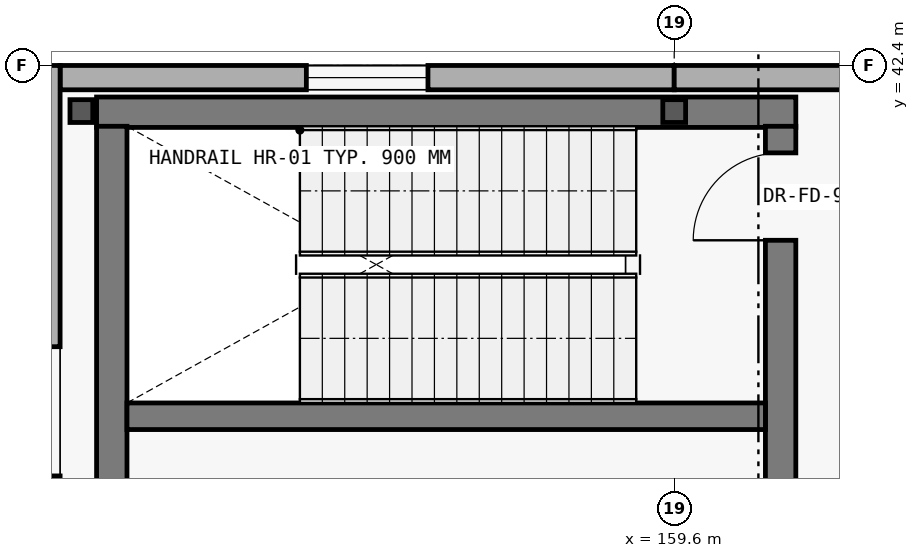
"""IFC4 building model, lengths in metres.
Left out: names, types, materials, properties, quantities, classifications, styles, units other than length and angle.
Written with IfcOpenShell. Run it as: python <this file> out.ifc"""

import sys

from ifc_helpers import new_model, si_unit, direction, frame, frame_2d, origin, origin_2d, place, context, subcontext, project, spatial, rectangle, i_section, extrude, element, fill, save


model = new_model("IFC4")
c1 = context("Model", 3, precision=1e-05, world=origin(), true_north=direction((0.0, 1.0)))
c2 = subcontext(c1, "Body", "Model", "MODEL_VIEW")
j1 = project(units=[si_unit("LENGTHUNIT", "METRE"), si_unit("PLANEANGLEUNIT", "RADIAN")], contexts=[c1])
p1 = place(None, origin())
s1 = spatial("IfcSite", under=j1, at=p1, CompositionType="ELEMENT")
p2 = place(p1, origin())
s2 = spatial("IfcBuilding", under=s1, at=p2, CompositionType="ELEMENT")
p3 = place(p2, frame((0.0, 0.0, 5.4)))
s3 = spatial("IfcBuildingStorey", under=s2, at=p3, CompositionType="ELEMENT", Elevation=5.4)
for number, where, z_axis, x_axis in (
    (1, (151.8, 41.8, 0.0), (0.0, 0.0, 1.0), (1.0, 0.0, 0.0)),
    (2, (159.6, 41.8, 0.0), (0.0, 0.0, 1.0), (1.0, 0.0, 0.0)),
):
    element("IfcColumn", number, at=place(p3, frame(where, z_axis=z_axis, x_axis=x_axis)), inside=s3, PredefinedType="COLUMN", context=c2, shape_type="SweptSolid", body=[
        extrude(i_section(OverallWidth=0.3, OverallDepth=0.3, WebThickness=0.011, FlangeThickness=0.019, at=origin_2d()), origin(), (0.0, 0.0, 1.0), 5.4),
    ])
p4 = place(p3, frame((151.52, 42.24, 0.0), z_axis=(0.0, 0.0, 1.0), x_axis=(1.0, 0.0, 0.0)))
e3 = element("IfcWall", 3, at=p4, inside=s3, PredefinedType="SOLIDWALL", context=c2, shape_type="SweptSolid", body=[
    extrude(rectangle(XDim=8.08, YDim=0.32, at=frame_2d((4.04, 0.0))), origin(), (0.0, 0.0, 1.0), 5.1),
])
p5 = place(p4, frame((3.24, 0.0, 0.9)))
e4 = element("IfcOpeningElement", 4, at=p5, cuts=e3, PredefinedType="OPENING", context=c2, shape_type="SweptSolid", body=[
    extrude(rectangle(XDim=1.6, YDim=1.6, at=frame_2d((0.8, 0.8))), frame((0.0, 0.17, 0.0), z_axis=(0.0, -1.0, 0.0), x_axis=(1.0, 0.0, 0.0)), (0.0, 0.0, 1.0), 0.34),
])
p6 = place(p3, frame((159.6, 42.24, 0.0), z_axis=(0.0, 0.0, 1.0), x_axis=(1.0, 0.0, 0.0)))
e5 = element("IfcWall", 5, at=p6, inside=s3, PredefinedType="SOLIDWALL", context=c2, shape_type="SweptSolid", body=[
    extrude(rectangle(XDim=8.4, YDim=0.32, at=frame_2d((4.2, 0.0))), origin(), (0.0, 0.0, 1.0), 5.1),
])
p7 = place(p6, frame((3.3, 0.0, 0.9)))
e6 = element("IfcOpeningElement", 6, at=p7, cuts=e5, PredefinedType="OPENING", context=c2, shape_type="SweptSolid", body=[
    extrude(rectangle(XDim=1.8, YDim=1.6, at=frame_2d((0.9, 0.8))), frame((0.0, 0.17, 0.0), z_axis=(0.0, -1.0, 0.0), x_axis=(1.0, 0.0, 0.0)), (0.0, 0.0, 1.0), 0.34),
])
p8 = place(p3, frame((151.36, 33.3, 0.0), z_axis=(0.0, 0.0, 1.0), x_axis=(0.0, 1.0, 0.0)))
e7 = element("IfcWall", 7, at=p8, inside=s3, PredefinedType="SOLIDWALL", context=c2, shape_type="SweptSolid", body=[
    extrude(rectangle(XDim=9.1, YDim=0.32, at=frame_2d((4.55, 0.0))), origin(), (0.0, 0.0, 1.0), 5.1),
])
p9 = place(p8, frame((3.7, 0.0, 0.9)))
e8 = element("IfcOpeningElement", 8, at=p9, cuts=e7, PredefinedType="OPENING", context=c2, shape_type="SweptSolid", body=[
    extrude(rectangle(XDim=1.7, YDim=2.0, at=frame_2d((0.85, 1.0))), frame((0.0, 0.17, 0.0), z_axis=(0.0, -1.0, 0.0), x_axis=(1.0, 0.0, 0.0)), (0.0, 0.0, 1.0), 0.34),
])
p10 = place(p3, frame((161.2, 41.785, 0.0), z_axis=(0.0, 0.0, 1.0), x_axis=(-1.0, 0.0, 0.0)))
e9 = element("IfcWall", 9, at=p10, inside=s3, PredefinedType="SHEAR", context=c2, shape_type="SweptSolid", body=[
    extrude(rectangle(XDim=9.2, YDim=0.4, at=frame_2d((4.6, 0.0))), origin(), (0.0, 0.0, 1.0), 5.08),
])
p11 = place(p3, frame((152.2, 41.6, 0.0), z_axis=(0.0, 0.0, 1.0), x_axis=(0.0, -1.0, 0.0)))
e10 = element("IfcWall", 10, at=p11, inside=s3, PredefinedType="SHEAR", context=c2, shape_type="SweptSolid", body=[
    extrude(rectangle(XDim=7.4, YDim=0.4, at=frame_2d((3.7, 0.0))), origin(), (0.0, 0.0, 1.0), 5.08),
])
p12 = place(p3, frame((161.0, 34.2, 0.0), z_axis=(0.0, 0.0, 1.0), x_axis=(0.0, 1.0, 0.0)))
e11 = element("IfcWall", 11, at=p12, inside=s3, PredefinedType="SHEAR", context=c2, shape_type="SweptSolid", body=[
    extrude(rectangle(XDim=7.4, YDim=0.4, at=frame_2d((3.7, 0.0))), origin(), (0.0, 0.0, 1.0), 5.08),
])
p13 = place(p12, frame((5.9, 0.0, 0.0)))
e12 = element("IfcOpeningElement", 12, at=p13, cuts=e11, PredefinedType="OPENING", context=c2, shape_type="SweptSolid", body=[
    extrude(rectangle(XDim=1.15, YDim=2.2, at=frame_2d((0.575, 1.1))), frame((0.0, 0.21, 0.0), z_axis=(0.0, -1.0, 0.0), x_axis=(1.0, 0.0, 0.0)), (0.0, 0.0, 1.0), 0.42),
])
p14 = place(p3, frame((152.4, 37.785, 0.0), z_axis=(0.0, 0.0, 1.0), x_axis=(1.0, 0.0, 0.0)))
e13 = element("IfcWall", 13, at=p14, inside=s3, PredefinedType="SHEAR", context=c2, shape_type="SweptSolid", body=[
    extrude(rectangle(XDim=8.4, YDim=0.35, at=frame_2d((4.2, 0.0))), origin(), (0.0, 0.0, 1.0), 5.08),
])
p15 = place(p5, origin())
e14 = element("IfcWindow", 14, at=p15, inside=s3, PartitioningType="SINGLE_PANEL", PredefinedType="WINDOW", context=c2, shape_type="SweptSolid", body=[
    extrude(rectangle(XDim=1.6, YDim=1.6, at=frame_2d((0.8, 0.8))), frame((0.0, 0.03, 0.0), z_axis=(0.0, -1.0, 0.0), x_axis=(1.0, 0.0, 0.0)), (0.0, 0.0, 1.0), 0.06),
])
fill(e4, e14)
p16 = place(p13, origin())
e15 = element("IfcDoor", 15, at=p16, inside=s3, OperationType="SINGLE_SWING_LEFT", PredefinedType="DOOR", context=c2, shape_type="SweptSolid", body=[
    extrude(rectangle(XDim=1.15, YDim=2.2, at=frame_2d((0.575, 1.1))), frame((0.0, 0.025, 0.0), z_axis=(0.0, -1.0, 0.0), x_axis=(1.0, 0.0, 0.0)), (0.0, 0.0, 1.0), 0.05),
])
fill(e12, e15)
save(model, sys.argv[1])
